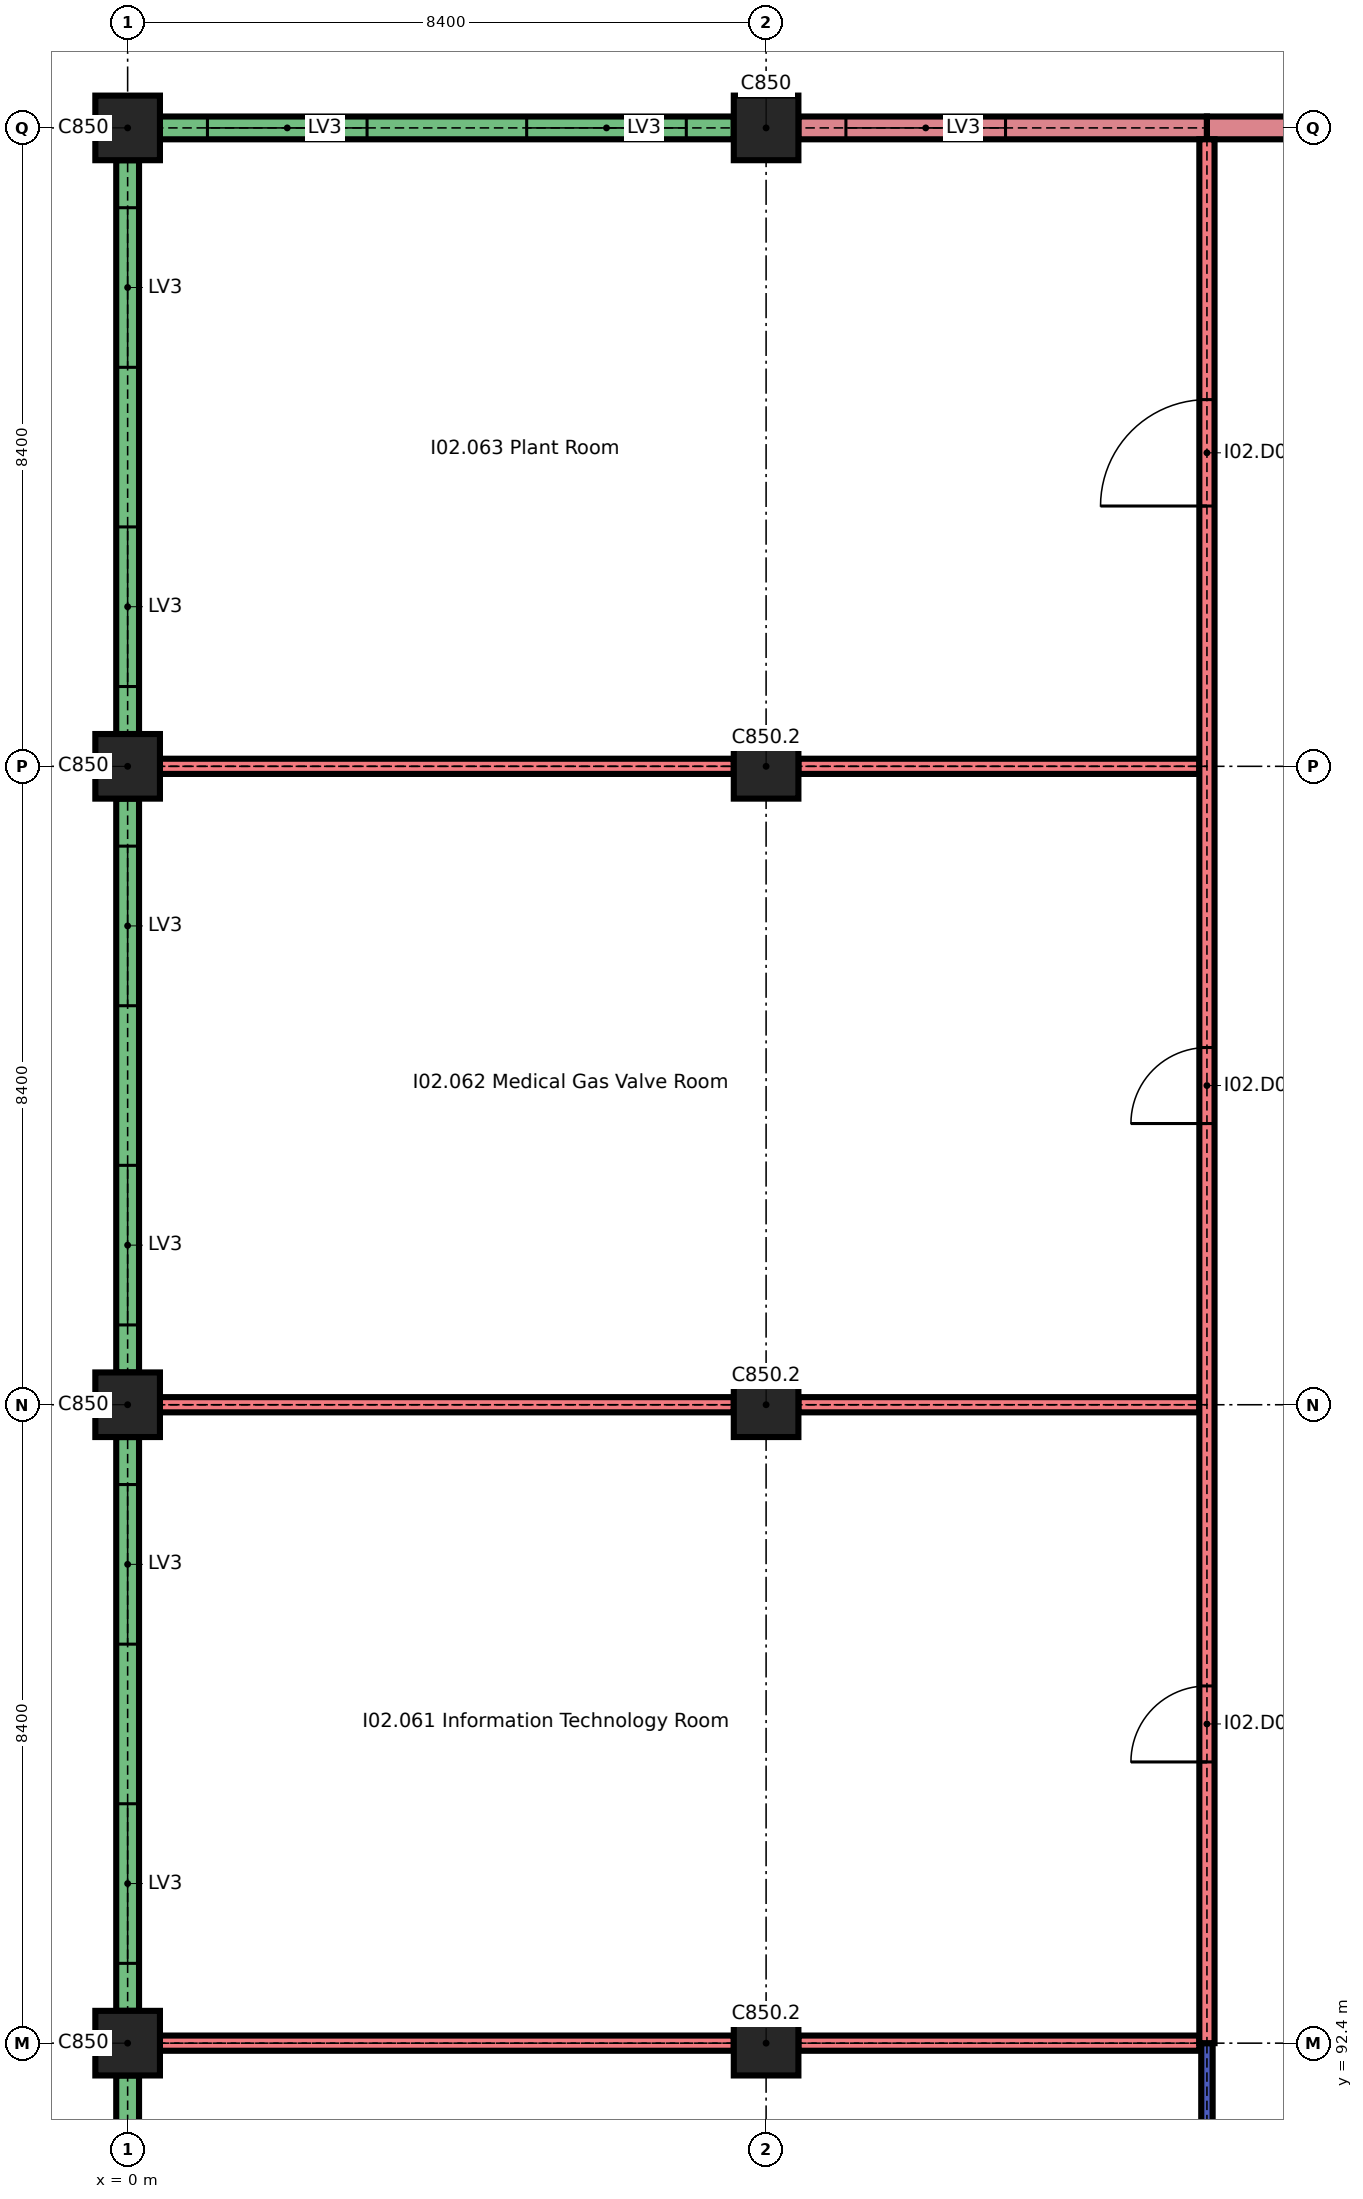
"""IFC4 building model, lengths in metres.
Left out: names, types, materials, properties, quantities, classifications, styles, units other than length and angle.
Written with IfcOpenShell. Run it as: python <this file> out.ifc"""

import sys

from ifc_helpers import new_model, si_unit, direction, frame, frame_2d, origin, origin_2d, place, context, subcontext, project, spatial, rectangle, extrude, element, fill, save


model = new_model("IFC4")
c1 = context("Model", 3, precision=1e-05, world=origin(), true_north=direction((0.0, 1.0)))
c2 = subcontext(c1, "Body", "Model", "MODEL_VIEW")
j1 = project(units=[si_unit("LENGTHUNIT", "METRE"), si_unit("PLANEANGLEUNIT", "RADIAN")], contexts=[c1])
p1 = place(None, origin())
s1 = spatial("IfcSite", under=j1, at=p1, CompositionType="ELEMENT")
p2 = place(p1, origin())
s2 = spatial("IfcBuilding", under=s1, at=p2, CompositionType="ELEMENT")
p3 = place(p2, frame((0.0, 0.0, 12.9)))
s3 = spatial("IfcBuildingStorey", under=s2, at=p3, CompositionType="ELEMENT", Elevation=12.9)
for number, where, z_axis, x_axis in (
    (1, (0.0, 92.4, 0.0), (0.0, 0.0, 1.0), (1.0, 0.0, 0.0)),
    (2, (8.4, 92.4, 0.0), (0.0, 0.0, 1.0), (1.0, 0.0, 0.0)),
    (3, (0.0, 100.8, 0.0), (0.0, 0.0, 1.0), (1.0, 0.0, 0.0)),
    (4, (8.4, 100.8, 0.0), (0.0, 0.0, 1.0), (1.0, 0.0, 0.0)),
    (5, (0.0, 109.2, 0.0), (0.0, 0.0, 1.0), (1.0, 0.0, 0.0)),
    (6, (8.4, 109.2, 0.0), (0.0, 0.0, 1.0), (1.0, 0.0, 0.0)),
    (7, (0.0, 117.6, 0.0), (0.0, 0.0, 1.0), (1.0, 0.0, 0.0)),
    (8, (8.4, 117.6, 0.0), (0.0, 0.0, 1.0), (1.0, 0.0, 0.0)),
):
    element("IfcColumn", number, at=place(p3, frame(where, z_axis=z_axis, x_axis=x_axis)), inside=s3, PredefinedType="COLUMN", context=c2, shape_type="SweptSolid", body=[
        extrude(rectangle(XDim=0.85, YDim=0.85, at=origin_2d()), origin(), (0.0, 0.0, 1.0), 2.04),
    ])
p4 = place(p3, frame((0.425, 117.6, 0.0), z_axis=(0.0, 0.0, 1.0), x_axis=(1.0, 0.0, 0.0)))
e9 = element("IfcWall", 9, at=p4, inside=s3, PredefinedType="SOLIDWALL", context=c2, shape_type="SweptSolid", body=[
    extrude(rectangle(XDim=7.55, YDim=0.3, at=frame_2d((3.775, 0.0))), origin(), (0.0, 0.0, 1.0), 1.74),
])
p5 = place(p4, frame((0.625, 0.0, 0.6)))
e10 = element("IfcOpeningElement", 10, at=p5, cuts=e9, PredefinedType="OPENING", context=c2, shape_type="SweptSolid", body=[
    extrude(rectangle(XDim=2.1, YDim=1.05, at=frame_2d((1.05, 0.525))), frame((0.0, 0.16, 0.0), z_axis=(0.0, -1.0, 0.0), x_axis=(1.0, 0.0, 0.0)), (0.0, 0.0, 1.0), 0.32),
])
p6 = place(p4, frame((4.825, 0.0, 0.6)))
e11 = element("IfcOpeningElement", 11, at=p6, cuts=e9, PredefinedType="OPENING", context=c2, shape_type="SweptSolid", body=[
    extrude(rectangle(XDim=2.1, YDim=1.05, at=frame_2d((1.05, 0.525))), frame((0.0, 0.16, 0.0), z_axis=(0.0, -1.0, 0.0), x_axis=(1.0, 0.0, 0.0)), (0.0, 0.0, 1.0), 0.32),
])
p7 = place(p3, frame((8.825, 117.6, 0.0), z_axis=(0.0, 0.0, 1.0), x_axis=(1.0, 0.0, 0.0)))
e12 = element("IfcWall", 12, at=p7, inside=s3, PredefinedType="SOLIDWALL", context=c2, shape_type="SweptSolid", body=[
    extrude(rectangle(XDim=5.375, YDim=0.3, at=frame_2d((2.688, 0.0))), origin(), (0.0, 0.0, 1.0), 2.04),
])
p8 = place(p7, frame((0.625, 0.0, 0.6)))
e13 = element("IfcOpeningElement", 13, at=p8, cuts=e12, PredefinedType="OPENING", context=c2, shape_type="SweptSolid", body=[
    extrude(rectangle(XDim=2.1, YDim=1.05, at=frame_2d((1.05, 0.525))), frame((0.0, 0.16, 0.0), z_axis=(0.0, -1.0, 0.0), x_axis=(1.0, 0.0, 0.0)), (0.0, 0.0, 1.0), 0.32),
])
p9 = place(p3, frame((14.2, 117.6, 0.0), z_axis=(0.0, 0.0, 1.0), x_axis=(1.0, 0.0, 0.0)))
e14 = element("IfcWall", 14, at=p9, inside=s3, PredefinedType="SOLIDWALL", context=c2, shape_type="SweptSolid", body=[
    extrude(rectangle(XDim=2.6, YDim=0.3, at=frame_2d((1.3, 0.0))), origin(), (0.0, 0.0, 1.0), 2.04),
])
p10 = place(p3, frame((0.0, 84.425, 0.0), z_axis=(0.0, 0.0, 1.0), x_axis=(0.0, 1.0, 0.0)))
e15 = element("IfcWall", 15, at=p10, inside=s3, PredefinedType="SOLIDWALL", context=c2, shape_type="SweptSolid", body=[
    extrude(rectangle(XDim=7.55, YDim=0.3, at=frame_2d((3.775, 0.0))), origin(), (0.0, 0.0, 1.0), 1.74),
])
p11 = place(p10, frame((0.625, 0.0, 0.6)))
e16 = element("IfcOpeningElement", 16, at=p11, cuts=e15, PredefinedType="OPENING", context=c2, shape_type="SweptSolid", body=[
    extrude(rectangle(XDim=2.1, YDim=1.05, at=frame_2d((1.05, 0.525))), frame((0.0, 0.16, 0.0), z_axis=(0.0, -1.0, 0.0), x_axis=(1.0, 0.0, 0.0)), (0.0, 0.0, 1.0), 0.32),
])
p12 = place(p10, frame((4.825, 0.0, 0.6)))
e17 = element("IfcOpeningElement", 17, at=p12, cuts=e15, PredefinedType="OPENING", context=c2, shape_type="SweptSolid", body=[
    extrude(rectangle(XDim=2.1, YDim=1.05, at=frame_2d((1.05, 0.525))), frame((0.0, 0.16, 0.0), z_axis=(0.0, -1.0, 0.0), x_axis=(1.0, 0.0, 0.0)), (0.0, 0.0, 1.0), 0.32),
])
p13 = place(p3, frame((0.0, 92.825, 0.0), z_axis=(0.0, 0.0, 1.0), x_axis=(0.0, 1.0, 0.0)))
e18 = element("IfcWall", 18, at=p13, inside=s3, PredefinedType="SOLIDWALL", context=c2, shape_type="SweptSolid", body=[
    extrude(rectangle(XDim=7.55, YDim=0.3, at=frame_2d((3.775, 0.0))), origin(), (0.0, 0.0, 1.0), 1.74),
])
p14 = place(p13, frame((0.625, 0.0, 0.6)))
e19 = element("IfcOpeningElement", 19, at=p14, cuts=e18, PredefinedType="OPENING", context=c2, shape_type="SweptSolid", body=[
    extrude(rectangle(XDim=2.1, YDim=1.05, at=frame_2d((1.05, 0.525))), frame((0.0, 0.16, 0.0), z_axis=(0.0, -1.0, 0.0), x_axis=(1.0, 0.0, 0.0)), (0.0, 0.0, 1.0), 0.32),
])
p15 = place(p13, frame((4.825, 0.0, 0.6)))
e20 = element("IfcOpeningElement", 20, at=p15, cuts=e18, PredefinedType="OPENING", context=c2, shape_type="SweptSolid", body=[
    extrude(rectangle(XDim=2.1, YDim=1.05, at=frame_2d((1.05, 0.525))), frame((0.0, 0.16, 0.0), z_axis=(0.0, -1.0, 0.0), x_axis=(1.0, 0.0, 0.0)), (0.0, 0.0, 1.0), 0.32),
])
p16 = place(p3, frame((0.0, 101.225, 0.0), z_axis=(0.0, 0.0, 1.0), x_axis=(0.0, 1.0, 0.0)))
e21 = element("IfcWall", 21, at=p16, inside=s3, PredefinedType="SOLIDWALL", context=c2, shape_type="SweptSolid", body=[
    extrude(rectangle(XDim=7.55, YDim=0.3, at=frame_2d((3.775, 0.0))), origin(), (0.0, 0.0, 1.0), 1.74),
])
p17 = place(p16, frame((0.625, 0.0, 0.6)))
e22 = element("IfcOpeningElement", 22, at=p17, cuts=e21, PredefinedType="OPENING", context=c2, shape_type="SweptSolid", body=[
    extrude(rectangle(XDim=2.1, YDim=1.05, at=frame_2d((1.05, 0.525))), frame((0.0, 0.16, 0.0), z_axis=(0.0, -1.0, 0.0), x_axis=(1.0, 0.0, 0.0)), (0.0, 0.0, 1.0), 0.32),
])
p18 = place(p16, frame((4.825, 0.0, 0.6)))
e23 = element("IfcOpeningElement", 23, at=p18, cuts=e21, PredefinedType="OPENING", context=c2, shape_type="SweptSolid", body=[
    extrude(rectangle(XDim=2.1, YDim=1.05, at=frame_2d((1.05, 0.525))), frame((0.0, 0.16, 0.0), z_axis=(0.0, -1.0, 0.0), x_axis=(1.0, 0.0, 0.0)), (0.0, 0.0, 1.0), 0.32),
])
p19 = place(p3, frame((0.0, 109.625, 0.0), z_axis=(0.0, 0.0, 1.0), x_axis=(0.0, 1.0, 0.0)))
e24 = element("IfcWall", 24, at=p19, inside=s3, PredefinedType="SOLIDWALL", context=c2, shape_type="SweptSolid", body=[
    extrude(rectangle(XDim=7.55, YDim=0.3, at=frame_2d((3.775, 0.0))), origin(), (0.0, 0.0, 1.0), 1.74),
])
p20 = place(p19, frame((0.625, 0.0, 0.6)))
e25 = element("IfcOpeningElement", 25, at=p20, cuts=e24, PredefinedType="OPENING", context=c2, shape_type="SweptSolid", body=[
    extrude(rectangle(XDim=2.1, YDim=1.05, at=frame_2d((1.05, 0.525))), frame((0.0, 0.16, 0.0), z_axis=(0.0, -1.0, 0.0), x_axis=(1.0, 0.0, 0.0)), (0.0, 0.0, 1.0), 0.32),
])
p21 = place(p19, frame((4.825, 0.0, 0.6)))
e26 = element("IfcOpeningElement", 26, at=p21, cuts=e24, PredefinedType="OPENING", context=c2, shape_type="SweptSolid", body=[
    extrude(rectangle(XDim=2.1, YDim=1.05, at=frame_2d((1.05, 0.525))), frame((0.0, 0.16, 0.0), z_axis=(0.0, -1.0, 0.0), x_axis=(1.0, 0.0, 0.0)), (0.0, 0.0, 1.0), 0.32),
])
p22 = place(p3, frame((0.425, 92.4, 0.0), z_axis=(0.0, 0.0, 1.0), x_axis=(1.0, 0.0, 0.0)))
e27 = element("IfcWall", 27, at=p22, inside=s3, PredefinedType="SOLIDWALL", context=c2, shape_type="SweptSolid", body=[
    extrude(rectangle(XDim=7.55, YDim=0.2, at=frame_2d((3.775, 0.0))), origin(), (0.0, 0.0, 1.0), 2.04),
])
p23 = place(p3, frame((8.825, 92.4, 0.0), z_axis=(0.0, 0.0, 1.0), x_axis=(1.0, 0.0, 0.0)))
e28 = element("IfcWall", 28, at=p23, inside=s3, PredefinedType="SOLIDWALL", context=c2, shape_type="SweptSolid", body=[
    extrude(rectangle(XDim=5.275, YDim=0.2, at=frame_2d((2.638, 0.0))), origin(), (0.0, 0.0, 1.0), 2.04),
])
p24 = place(p3, frame((0.425, 100.8, 0.0), z_axis=(0.0, 0.0, 1.0), x_axis=(1.0, 0.0, 0.0)))
e29 = element("IfcWall", 29, at=p24, inside=s3, PredefinedType="SOLIDWALL", context=c2, shape_type="SweptSolid", body=[
    extrude(rectangle(XDim=7.55, YDim=0.2, at=frame_2d((3.775, 0.0))), origin(), (0.0, 0.0, 1.0), 2.04),
])
p25 = place(p3, frame((8.825, 100.8, 0.0), z_axis=(0.0, 0.0, 1.0), x_axis=(1.0, 0.0, 0.0)))
e30 = element("IfcWall", 30, at=p25, inside=s3, PredefinedType="SOLIDWALL", context=c2, shape_type="SweptSolid", body=[
    extrude(rectangle(XDim=5.275, YDim=0.2, at=frame_2d((2.638, 0.0))), origin(), (0.0, 0.0, 1.0), 2.04),
])
p26 = place(p3, frame((0.425, 109.2, 0.0), z_axis=(0.0, 0.0, 1.0), x_axis=(1.0, 0.0, 0.0)))
e31 = element("IfcWall", 31, at=p26, inside=s3, PredefinedType="SOLIDWALL", context=c2, shape_type="SweptSolid", body=[
    extrude(rectangle(XDim=7.55, YDim=0.2, at=frame_2d((3.775, 0.0))), origin(), (0.0, 0.0, 1.0), 2.04),
])
p27 = place(p3, frame((8.825, 109.2, 0.0), z_axis=(0.0, 0.0, 1.0), x_axis=(1.0, 0.0, 0.0)))
e32 = element("IfcWall", 32, at=p27, inside=s3, PredefinedType="SOLIDWALL", context=c2, shape_type="SweptSolid", body=[
    extrude(rectangle(XDim=5.275, YDim=0.2, at=frame_2d((2.638, 0.0))), origin(), (0.0, 0.0, 1.0), 2.04),
])
p28 = place(p3, frame((14.2, 75.675, 0.0), z_axis=(0.0, 0.0, 1.0), x_axis=(0.0, 1.0, 0.0)))
e33 = element("IfcWall", 33, at=p28, inside=s3, PredefinedType="PARTITIONING", context=c2, shape_type="SweptSolid", body=[
    extrude(rectangle(XDim=16.725, YDim=0.15, at=frame_2d((8.362, 0.0))), origin(), (0.0, 0.0, 1.0), 2.04),
])
p29 = place(p28, frame((7.663, 0.0, 0.0)))
e34 = element("IfcOpeningElement", 34, at=p29, cuts=e33, PredefinedType="OPENING", context=c2, shape_type="SweptSolid", body=[
    extrude(rectangle(XDim=1.4, YDim=2.0, at=frame_2d((0.7, 1.0))), frame((0.0, 0.085, 0.0), z_axis=(0.0, -1.0, 0.0), x_axis=(1.0, 0.0, 0.0)), (0.0, 0.0, 1.0), 0.17),
])
p30 = place(p3, frame((14.2, 92.4, 0.0), z_axis=(0.0, 0.0, 1.0), x_axis=(0.0, 1.0, 0.0)))
e35 = element("IfcWall", 35, at=p30, inside=s3, PredefinedType="SOLIDWALL", context=c2, shape_type="SweptSolid", body=[
    extrude(rectangle(XDim=25.05, YDim=0.2, at=frame_2d((12.525, 0.0))), origin(), (0.0, 0.0, 1.0), 2.04),
])
p31 = place(p30, frame((3.7, 0.0, 0.0)))
e36 = element("IfcOpeningElement", 36, at=p31, cuts=e35, PredefinedType="OPENING", context=c2, shape_type="SweptSolid", body=[
    extrude(rectangle(XDim=1.0, YDim=2.0, at=frame_2d((0.5, 1.0))), frame((0.0, 0.11, 0.0), z_axis=(0.0, -1.0, 0.0), x_axis=(1.0, 0.0, 0.0)), (0.0, 0.0, 1.0), 0.22),
])
p32 = place(p30, frame((12.1, 0.0, 0.0)))
e37 = element("IfcOpeningElement", 37, at=p32, cuts=e35, PredefinedType="OPENING", context=c2, shape_type="SweptSolid", body=[
    extrude(rectangle(XDim=1.0, YDim=2.0, at=frame_2d((0.5, 1.0))), frame((0.0, 0.11, 0.0), z_axis=(0.0, -1.0, 0.0), x_axis=(1.0, 0.0, 0.0)), (0.0, 0.0, 1.0), 0.22),
])
p33 = place(p30, frame((20.225, 0.0, 0.0)))
e38 = element("IfcOpeningElement", 38, at=p33, cuts=e35, PredefinedType="OPENING", context=c2, shape_type="SweptSolid", body=[
    extrude(rectangle(XDim=1.4, YDim=2.0, at=frame_2d((0.7, 1.0))), frame((0.0, 0.11, 0.0), z_axis=(0.0, -1.0, 0.0), x_axis=(1.0, 0.0, 0.0)), (0.0, 0.0, 1.0), 0.22),
])
p34 = place(p5, origin())
e39 = element("IfcWindow", 39, at=p34, inside=s3, PartitioningType="SINGLE_PANEL", PredefinedType="WINDOW", context=c2, shape_type="SweptSolid", body=[
    extrude(rectangle(XDim=2.1, YDim=1.05, at=frame_2d((1.05, 0.525))), frame((0.0, 0.075, 0.0), z_axis=(0.0, -1.0, 0.0), x_axis=(1.0, 0.0, 0.0)), (0.0, 0.0, 1.0), 0.15),
])
fill(e10, e39)
p35 = place(p6, origin())
e40 = element("IfcWindow", 40, at=p35, inside=s3, PartitioningType="SINGLE_PANEL", PredefinedType="WINDOW", context=c2, shape_type="SweptSolid", body=[
    extrude(rectangle(XDim=2.1, YDim=1.05, at=frame_2d((1.05, 0.525))), frame((0.0, 0.075, 0.0), z_axis=(0.0, -1.0, 0.0), x_axis=(1.0, 0.0, 0.0)), (0.0, 0.0, 1.0), 0.15),
])
fill(e11, e40)
p36 = place(p8, origin())
e41 = element("IfcWindow", 41, at=p36, inside=s3, PartitioningType="SINGLE_PANEL", PredefinedType="WINDOW", context=c2, shape_type="SweptSolid", body=[
    extrude(rectangle(XDim=2.1, YDim=1.05, at=frame_2d((1.05, 0.525))), frame((0.0, 0.075, 0.0), z_axis=(0.0, -1.0, 0.0), x_axis=(1.0, 0.0, 0.0)), (0.0, 0.0, 1.0), 0.15),
])
fill(e13, e41)
p37 = place(p14, origin())
e42 = element("IfcWindow", 42, at=p37, inside=s3, PartitioningType="SINGLE_PANEL", PredefinedType="WINDOW", context=c2, shape_type="SweptSolid", body=[
    extrude(rectangle(XDim=2.1, YDim=1.05, at=frame_2d((1.05, 0.525))), frame((0.0, 0.075, 0.0), z_axis=(0.0, -1.0, 0.0), x_axis=(1.0, 0.0, 0.0)), (0.0, 0.0, 1.0), 0.15),
])
fill(e19, e42)
p38 = place(p15, origin())
e43 = element("IfcWindow", 43, at=p38, inside=s3, PartitioningType="SINGLE_PANEL", PredefinedType="WINDOW", context=c2, shape_type="SweptSolid", body=[
    extrude(rectangle(XDim=2.1, YDim=1.05, at=frame_2d((1.05, 0.525))), frame((0.0, 0.075, 0.0), z_axis=(0.0, -1.0, 0.0), x_axis=(1.0, 0.0, 0.0)), (0.0, 0.0, 1.0), 0.15),
])
fill(e20, e43)
p39 = place(p17, origin())
e44 = element("IfcWindow", 44, at=p39, inside=s3, PartitioningType="SINGLE_PANEL", PredefinedType="WINDOW", context=c2, shape_type="SweptSolid", body=[
    extrude(rectangle(XDim=2.1, YDim=1.05, at=frame_2d((1.05, 0.525))), frame((0.0, 0.075, 0.0), z_axis=(0.0, -1.0, 0.0), x_axis=(1.0, 0.0, 0.0)), (0.0, 0.0, 1.0), 0.15),
])
fill(e22, e44)
p40 = place(p18, origin())
e45 = element("IfcWindow", 45, at=p40, inside=s3, PartitioningType="SINGLE_PANEL", PredefinedType="WINDOW", context=c2, shape_type="SweptSolid", body=[
    extrude(rectangle(XDim=2.1, YDim=1.05, at=frame_2d((1.05, 0.525))), frame((0.0, 0.075, 0.0), z_axis=(0.0, -1.0, 0.0), x_axis=(1.0, 0.0, 0.0)), (0.0, 0.0, 1.0), 0.15),
])
fill(e23, e45)
p41 = place(p20, origin())
e46 = element("IfcWindow", 46, at=p41, inside=s3, PartitioningType="SINGLE_PANEL", PredefinedType="WINDOW", context=c2, shape_type="SweptSolid", body=[
    extrude(rectangle(XDim=2.1, YDim=1.05, at=frame_2d((1.05, 0.525))), frame((0.0, 0.075, 0.0), z_axis=(0.0, -1.0, 0.0), x_axis=(1.0, 0.0, 0.0)), (0.0, 0.0, 1.0), 0.15),
])
fill(e25, e46)
p42 = place(p21, origin())
e47 = element("IfcWindow", 47, at=p42, inside=s3, PartitioningType="SINGLE_PANEL", PredefinedType="WINDOW", context=c2, shape_type="SweptSolid", body=[
    extrude(rectangle(XDim=2.1, YDim=1.05, at=frame_2d((1.05, 0.525))), frame((0.0, 0.075, 0.0), z_axis=(0.0, -1.0, 0.0), x_axis=(1.0, 0.0, 0.0)), (0.0, 0.0, 1.0), 0.15),
])
fill(e26, e47)
p43 = place(p31, origin())
e48 = element("IfcDoor", 48, at=p43, inside=s3, OperationType="SINGLE_SWING_RIGHT", PredefinedType="DOOR", context=c2, shape_type="SweptSolid", body=[
    extrude(rectangle(XDim=1.0, YDim=2.0, at=frame_2d((0.5, 1.0))), frame((0.0, 0.025, 0.0), z_axis=(0.0, -1.0, 0.0), x_axis=(1.0, 0.0, 0.0)), (0.0, 0.0, 1.0), 0.05),
])
fill(e36, e48)
p44 = place(p32, origin())
e49 = element("IfcDoor", 49, at=p44, inside=s3, OperationType="SINGLE_SWING_RIGHT", PredefinedType="DOOR", context=c2, shape_type="SweptSolid", body=[
    extrude(rectangle(XDim=1.0, YDim=2.0, at=frame_2d((0.5, 1.0))), frame((0.0, 0.025, 0.0), z_axis=(0.0, -1.0, 0.0), x_axis=(1.0, 0.0, 0.0)), (0.0, 0.0, 1.0), 0.05),
])
fill(e37, e49)
p45 = place(p33, origin())
e50 = element("IfcDoor", 50, at=p45, inside=s3, OperationType="SINGLE_SWING_RIGHT", PredefinedType="DOOR", context=c2, shape_type="SweptSolid", body=[
    extrude(rectangle(XDim=1.4, YDim=2.0, at=frame_2d((0.7, 1.0))), frame((0.0, 0.025, 0.0), z_axis=(0.0, -1.0, 0.0), x_axis=(1.0, 0.0, 0.0)), (0.0, 0.0, 1.0), 0.05),
])
fill(e38, e50)
save(model, sys.argv[1])
